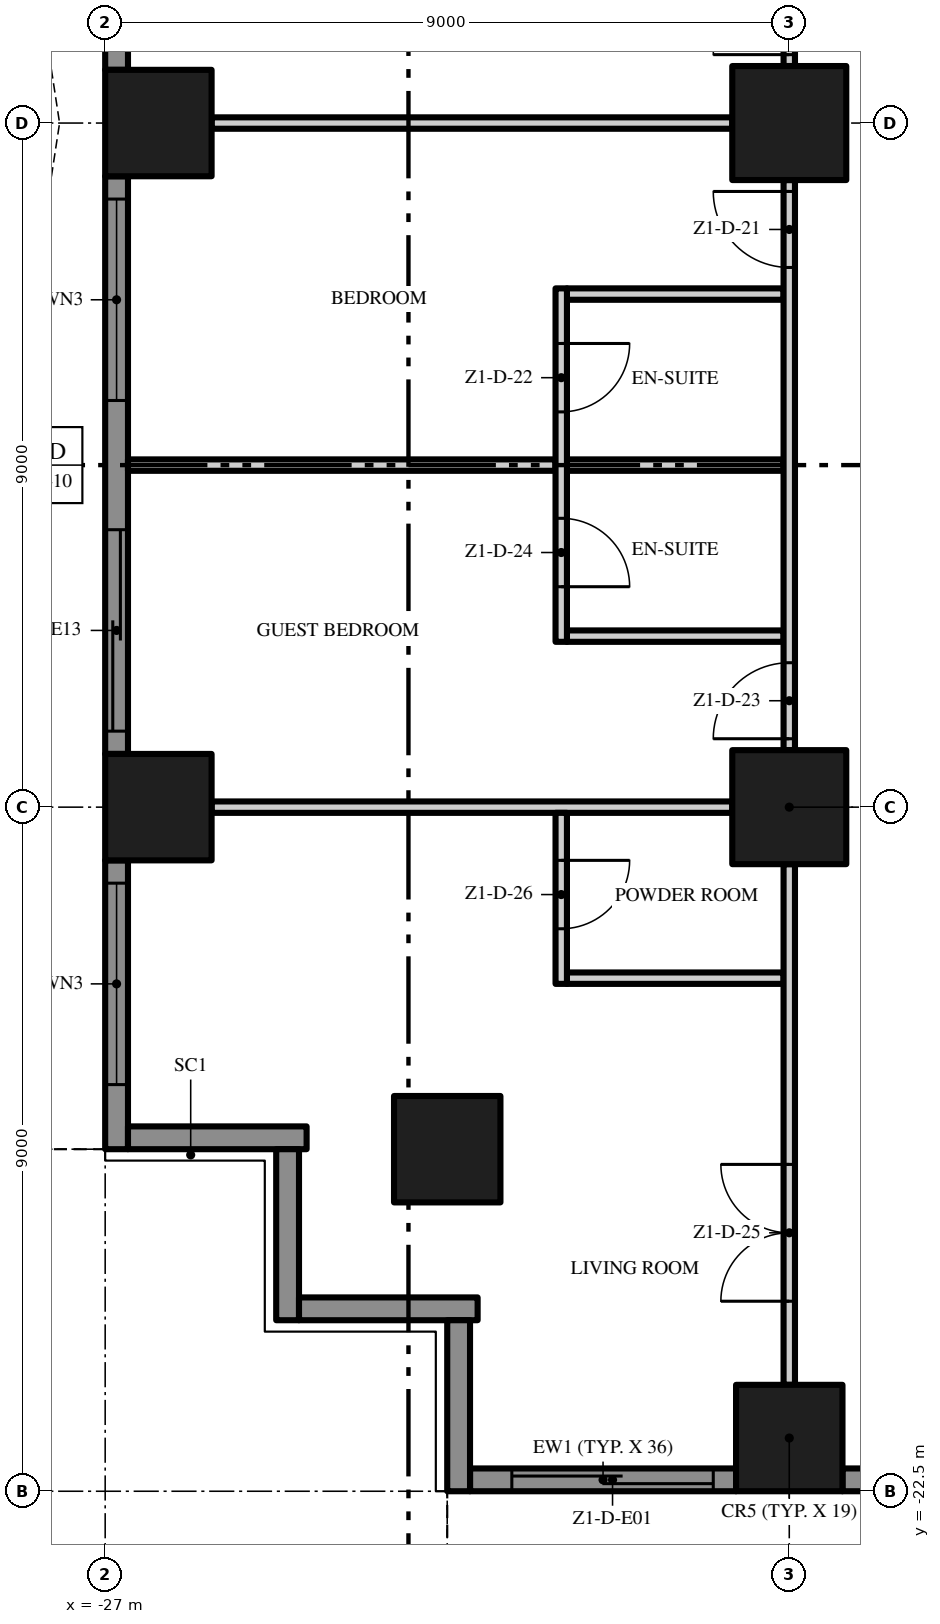
"""IFC4 building model, lengths in metres.
Left out: names, types, materials, properties, quantities, classifications, styles, units other than length and angle.
Written with IfcOpenShell. Run it as: python <this file> out.ifc"""

import sys

from ifc_helpers import new_model, si_unit, direction, frame, frame_2d, origin, origin_2d, place, context, subcontext, project, spatial, polyline, rectangle, outline, extrude, element, fill, save


model = new_model("IFC4")
c1 = context("Model", 3, precision=1e-05, world=origin(), true_north=direction((0.0, 1.0)))
c2 = subcontext(c1, "Body", "Model", "MODEL_VIEW")
j1 = project(units=[si_unit("LENGTHUNIT", "METRE"), si_unit("PLANEANGLEUNIT", "RADIAN")], contexts=[c1])
p1 = place(None, origin())
s1 = spatial("IfcSite", under=j1, at=p1, CompositionType="ELEMENT")
p2 = place(p1, origin())
s2 = spatial("IfcBuilding", under=s1, at=p2, CompositionType="ELEMENT")
p3 = place(p2, frame((0.0, 0.0, 53.0)))
s3 = spatial("IfcBuildingStorey", under=s2, at=p3, CompositionType="ELEMENT", Elevation=53.0)
p4 = place(p3, frame((-18.0, -13.5, 0.0), z_axis=(0.0, 0.0, 1.0), x_axis=(1.0, 0.0, 0.0)))
e1 = element("IfcColumn", 1, at=p4, inside=s3, PredefinedType="COLUMN", context=c2, shape_type="SweptSolid", body=[
    extrude(rectangle(XDim=1.5, YDim=1.5, at=origin_2d()), origin(), (0.0, 0.0, 1.0), 3.5),
])
p5 = place(p3, frame((-18.0, -21.8, 0.0), z_axis=(0.0, 0.0, 1.0), x_axis=(1.0, 0.0, 0.0)))
e2 = element("IfcColumn", 2, at=p5, inside=s3, PredefinedType="COLUMN", context=c2, shape_type="SweptSolid", body=[
    extrude(rectangle(XDim=1.4, YDim=1.4, at=origin_2d()), origin(), (0.0, 0.0, 1.0), 3.5),
])
p6 = place(p3, frame((-18.0, -4.5, 0.0), z_axis=(0.0, 0.0, 1.0), x_axis=(1.0, 0.0, 0.0)))
e3 = element("IfcColumn", 3, at=p6, inside=s3, PredefinedType="COLUMN", context=c2, shape_type="SweptSolid", body=[
    extrude(rectangle(XDim=1.5, YDim=1.5, at=origin_2d()), origin(), (0.0, 0.0, 1.0), 3.5),
])
for number, where, z_axis, x_axis in (
    (4, (-26.3, -13.5, 0.0), (0.0, 0.0, 1.0), (1.0, 0.0, 0.0)),
    (5, (-22.5, -18.0, 0.0), (0.0, 0.0, 1.0), (1.0, 0.0, 0.0)),
    (6, (-26.3, -4.5, 0.0), (0.0, 0.0, 1.0), (1.0, 0.0, 0.0)),
):
    element("IfcColumn", number, at=place(p3, frame(where, z_axis=z_axis, x_axis=x_axis)), inside=s3, PredefinedType="COLUMN", context=c2, shape_type="SweptSolid", body=[
        extrude(rectangle(XDim=1.4, YDim=1.4, at=origin_2d()), origin(), (0.0, 0.0, 1.0), 3.5),
    ])
p7 = place(p3, frame((-18.7, -22.35, 0.0), z_axis=(0.0, 0.0, 1.0), x_axis=(-1.0, 0.0, 0.0)))
e7 = element("IfcWall", 7, at=p7, inside=s3, PredefinedType="SOLIDWALL", context=c2, shape_type="SweptSolid", body=[
    extrude(rectangle(XDim=3.5, YDim=0.3, at=frame_2d((1.75, 0.0))), origin(), (0.0, 0.0, 1.0), 3.5),
])
p8 = place(p7, frame((0.3, 0.0, 0.0)))
e8 = element("IfcOpeningElement", 8, at=p8, cuts=e7, PredefinedType="OPENING", context=c2, shape_type="SweptSolid", body=[
    extrude(rectangle(XDim=2.65, YDim=2.4, at=frame_2d((1.325, 1.2))), frame((0.0, 0.16, 0.0), z_axis=(0.0, -1.0, 0.0), x_axis=(1.0, 0.0, 0.0)), (0.0, 0.0, 1.0), 0.32),
])
p9 = place(p3, frame((-9.7, -22.35, 0.0), z_axis=(0.0, 0.0, 1.0), x_axis=(-1.0, 0.0, 0.0)))
e9 = element("IfcWall", 9, at=p9, inside=s3, PredefinedType="SOLIDWALL", context=c2, shape_type="SweptSolid", body=[
    extrude(rectangle(XDim=7.6, YDim=0.3, at=frame_2d((3.8, 0.0))), origin(), (0.0, 0.0, 1.0), 3.5),
])
p10 = place(p9, frame((4.65, 0.0, 0.45)))
e10 = element("IfcOpeningElement", 10, at=p10, cuts=e9, PredefinedType="OPENING", context=c2, shape_type="SweptSolid", body=[
    extrude(rectangle(XDim=2.65, YDim=2.65, at=frame_2d((1.325, 1.325))), frame((0.0, 0.16, 0.0), z_axis=(0.0, -1.0, 0.0), x_axis=(1.0, 0.0, 0.0)), (0.0, 0.0, 1.0), 0.32),
])
p11 = place(p9, frame((0.3, 0.0, 0.45)))
e11 = element("IfcOpeningElement", 11, at=p11, cuts=e9, PredefinedType="OPENING", context=c2, shape_type="SweptSolid", body=[
    extrude(rectangle(XDim=2.65, YDim=2.65, at=frame_2d((1.325, 1.325))), frame((0.0, 0.16, 0.0), z_axis=(0.0, -1.0, 0.0), x_axis=(1.0, 0.0, 0.0)), (0.0, 0.0, 1.0), 0.32),
])
p12 = place(p3, frame((-26.85, -3.8, 0.0), z_axis=(0.0, 0.0, 1.0), x_axis=(0.0, 1.0, 0.0)))
e12 = element("IfcWall", 12, at=p12, inside=s3, PredefinedType="SOLIDWALL", context=c2, shape_type="SweptSolid", body=[
    extrude(rectangle(XDim=7.6, YDim=0.3, at=frame_2d((3.8, 0.0))), origin(), (0.0, 0.0, 1.0), 3.5),
])
p13 = place(p12, frame((4.65, 0.0, 0.0)))
e13 = element("IfcOpeningElement", 13, at=p13, cuts=e12, PredefinedType="OPENING", context=c2, shape_type="SweptSolid", body=[
    extrude(rectangle(XDim=2.65, YDim=2.4, at=frame_2d((1.325, 1.2))), frame((0.0, 0.16, 0.0), z_axis=(0.0, -1.0, 0.0), x_axis=(1.0, 0.0, 0.0)), (0.0, 0.0, 1.0), 0.32),
])
p14 = place(p12, frame((0.3, 0.0, 0.45)))
e14 = element("IfcOpeningElement", 14, at=p14, cuts=e12, PredefinedType="OPENING", context=c2, shape_type="SweptSolid", body=[
    extrude(rectangle(XDim=2.65, YDim=2.65, at=frame_2d((1.325, 1.325))), frame((0.0, 0.16, 0.0), z_axis=(0.0, -1.0, 0.0), x_axis=(1.0, 0.0, 0.0)), (0.0, 0.0, 1.0), 0.32),
])
p15 = place(p3, frame((-26.85, -12.8, 0.0), z_axis=(0.0, 0.0, 1.0), x_axis=(0.0, 1.0, 0.0)))
e15 = element("IfcWall", 15, at=p15, inside=s3, PredefinedType="SOLIDWALL", context=c2, shape_type="SweptSolid", body=[
    extrude(rectangle(XDim=7.6, YDim=0.3, at=frame_2d((3.8, 0.0))), origin(), (0.0, 0.0, 1.0), 3.5),
])
p16 = place(p15, frame((4.65, 0.0, 0.45)))
e16 = element("IfcOpeningElement", 16, at=p16, cuts=e15, PredefinedType="OPENING", context=c2, shape_type="SweptSolid", body=[
    extrude(rectangle(XDim=2.65, YDim=2.65, at=frame_2d((1.325, 1.325))), frame((0.0, 0.16, 0.0), z_axis=(0.0, -1.0, 0.0), x_axis=(1.0, 0.0, 0.0)), (0.0, 0.0, 1.0), 0.32),
])
p17 = place(p15, frame((0.3, 0.0, 0.0)))
e17 = element("IfcOpeningElement", 17, at=p17, cuts=e15, PredefinedType="OPENING", context=c2, shape_type="SweptSolid", body=[
    extrude(rectangle(XDim=2.65, YDim=2.4, at=frame_2d((1.325, 1.2))), frame((0.0, 0.16, 0.0), z_axis=(0.0, -1.0, 0.0), x_axis=(1.0, 0.0, 0.0)), (0.0, 0.0, 1.0), 0.32),
])
p18 = place(p3, frame((-26.85, -18.0, 0.0), z_axis=(0.0, 0.0, 1.0), x_axis=(0.0, 1.0, 0.0)))
e18 = element("IfcWall", 18, at=p18, inside=s3, PredefinedType="SOLIDWALL", context=c2, shape_type="SweptSolid", body=[
    extrude(rectangle(XDim=3.8, YDim=0.3, at=frame_2d((1.9, 0.0))), origin(), (0.0, 0.0, 1.0), 3.5),
])
p19 = place(p18, frame((0.85, 0.0, 0.45)))
e19 = element("IfcOpeningElement", 19, at=p19, cuts=e18, PredefinedType="OPENING", context=c2, shape_type="SweptSolid", body=[
    extrude(rectangle(XDim=2.65, YDim=2.65, at=frame_2d((1.325, 1.325))), frame((0.0, 0.16, 0.0), z_axis=(0.0, -1.0, 0.0), x_axis=(1.0, 0.0, 0.0)), (0.0, 0.0, 1.0), 0.32),
])
p20 = place(p3, frame((-24.35, -17.85, 0.0), z_axis=(0.0, 0.0, 1.0), x_axis=(-1.0, 0.0, 0.0)))
e20 = element("IfcWall", 20, at=p20, inside=s3, PredefinedType="SOLIDWALL", context=c2, shape_type="SweptSolid", body=[
    extrude(rectangle(XDim=2.35, YDim=0.3, at=frame_2d((1.175, 0.0))), origin(), (0.0, 0.0, 1.0), 3.5),
])
p21 = place(p3, frame((-24.6, -20.25, 0.0), z_axis=(0.0, 0.0, 1.0), x_axis=(0.0, 1.0, 0.0)))
e21 = element("IfcWall", 21, at=p21, inside=s3, PredefinedType="SOLIDWALL", context=c2, shape_type="SweptSolid", body=[
    extrude(rectangle(XDim=2.25, YDim=0.3, at=frame_2d((1.125, 0.0))), origin(), (0.0, 0.0, 1.0), 3.5),
])
p22 = place(p3, frame((-22.1, -20.1, 0.0), z_axis=(0.0, 0.0, 1.0), x_axis=(-1.0, 0.0, 0.0)))
e22 = element("IfcWall", 22, at=p22, inside=s3, PredefinedType="SOLIDWALL", context=c2, shape_type="SweptSolid", body=[
    extrude(rectangle(XDim=2.35, YDim=0.3, at=frame_2d((1.175, 0.0))), origin(), (0.0, 0.0, 1.0), 3.5),
])
p23 = place(p3, frame((-22.35, -22.5, 0.0), z_axis=(0.0, 0.0, 1.0), x_axis=(0.0, 1.0, 0.0)))
e23 = element("IfcWall", 23, at=p23, inside=s3, PredefinedType="SOLIDWALL", context=c2, shape_type="SweptSolid", body=[
    extrude(rectangle(XDim=2.25, YDim=0.3, at=frame_2d((1.125, 0.0))), origin(), (0.0, 0.0, 1.0), 3.5),
])
p24 = place(p3, origin())
e24 = element("IfcWall", 24, at=p24, inside=s3, PredefinedType="USERDEFINED", context=c2, shape_type="SweptSolid", body=[
    extrude(outline(polyline([(-22.5, -25.5), (-21.0, -25.271), (-19.5, -24.671), (-18.0, -23.929), (-16.5, -23.329), (-15.0, -23.1), (-13.5, -23.329), (-12.0, -23.929), (-10.5, -24.671), (-9.0, -25.271), (-7.5, -25.5), (-6.0, -25.271), (-4.5, -24.671), (-3.0, -23.929), (-1.5, -23.329), (0.0, -23.1), (1.5, -23.329), (3.0, -23.929), (4.5, -24.671), (6.0, -25.271), (7.5, -25.5), (9.0, -25.271), (10.5, -24.671), (12.0, -23.929), (13.5, -23.329), (15.0, -23.1), (16.5, -23.329), (18.0, -23.929), (19.5, -24.671), (21.0, -25.271), (22.5, -25.5), (22.538, -25.253), (21.066, -25.028), (19.602, -24.442), (18.102, -23.701), (16.566, -23.086), (15.0, -22.847), (13.434, -23.086), (11.898, -23.701), (10.398, -24.442), (8.934, -25.028), (7.5, -25.247), (6.066, -25.028), (4.602, -24.442), (3.102, -23.701), (1.566, -23.086), (0.0, -22.847), (-1.566, -23.086), (-3.102, -23.701), (-4.602, -24.442), (-6.066, -25.028), (-7.5, -25.247), (-8.934, -25.028), (-10.398, -24.442), (-11.898, -23.701), (-13.434, -23.086), (-15.0, -22.847), (-16.566, -23.086), (-18.102, -23.701), (-19.602, -24.442), (-21.066, -25.028), (-22.538, -25.253), (-22.5, -25.5)])), origin(), (0.0, 0.0, 1.0), 0.9),
])
p25 = place(p3, origin())
e25 = element("IfcWall", 25, at=p25, inside=s3, PredefinedType="USERDEFINED", context=c2, shape_type="SweptSolid", body=[
    extrude(outline(polyline([(-30.0, 18.0), (-29.771, 16.5), (-29.171, 15.0), (-28.429, 13.5), (-27.829, 12.0), (-27.6, 10.5), (-27.829, 9.0), (-28.429, 7.5), (-29.171, 6.0), (-29.771, 4.5), (-30.0, 3.0), (-29.771, 1.5), (-29.171, 0.0), (-28.429, -1.5), (-27.829, -3.0), (-27.6, -4.5), (-27.829, -6.0), (-28.429, -7.5), (-29.171, -9.0), (-29.771, -10.5), (-30.0, -12.0), (-29.771, -13.5), (-29.171, -15.0), (-28.429, -16.5), (-27.829, -18.0), (-27.597, -17.907), (-28.201, -16.398), (-28.942, -14.898), (-29.528, -13.434), (-29.747, -12.0), (-29.528, -10.566), (-28.942, -9.102), (-28.201, -7.602), (-27.586, -6.066), (-27.347, -4.5), (-27.586, -2.934), (-28.201, -1.398), (-28.942, 0.102), (-29.528, 1.566), (-29.747, 3.0), (-29.528, 4.434), (-28.942, 5.898), (-28.201, 7.398), (-27.586, 8.934), (-27.347, 10.5), (-27.586, 12.066), (-28.201, 13.602), (-28.942, 15.102), (-29.528, 16.566), (-29.753, 18.038), (-30.0, 18.0)])), origin(), (0.0, 0.0, 1.0), 0.9),
])
p26 = place(p3, frame((-20.925, -15.75, 0.0), z_axis=(0.0, 0.0, 1.0), x_axis=(1.0, 0.0, 0.0)))
e26 = element("IfcWall", 26, at=p26, inside=s3, PredefinedType="PARTITIONING", context=c2, shape_type="SweptSolid", body=[
    extrude(rectangle(XDim=2.85, YDim=0.15, at=frame_2d((1.425, 0.0))), origin(), (0.0, 0.0, 1.0), 3.5),
])
p27 = place(p3, frame((-25.6, -13.5, 0.0), z_axis=(0.0, 0.0, 1.0), x_axis=(1.0, 0.0, 0.0)))
e27 = element("IfcWall", 27, at=p27, inside=s3, PredefinedType="PARTITIONING", context=c2, shape_type="SweptSolid", body=[
    extrude(rectangle(XDim=6.85, YDim=0.15, at=frame_2d((3.425, 0.0))), origin(), (0.0, 0.0, 1.0), 3.5),
])
p28 = place(p3, frame((-20.925, -11.25, 0.0), z_axis=(0.0, 0.0, 1.0), x_axis=(1.0, 0.0, 0.0)))
e28 = element("IfcWall", 28, at=p28, inside=s3, PredefinedType="PARTITIONING", context=c2, shape_type="SweptSolid", body=[
    extrude(rectangle(XDim=2.85, YDim=0.15, at=frame_2d((1.425, 0.0))), origin(), (0.0, 0.0, 1.0), 3.5),
])
p29 = place(p3, frame((-26.7, -9.0, 0.0), z_axis=(0.0, 0.0, 1.0), x_axis=(1.0, 0.0, 0.0)))
e29 = element("IfcWall", 29, at=p29, inside=s3, PredefinedType="PARTITIONING", context=c2, shape_type="SweptSolid", body=[
    extrude(rectangle(XDim=5.625, YDim=0.15, at=frame_2d((2.812, 0.0))), origin(), (0.0, 0.0, 1.0), 3.5),
])
for number, where, z_axis, x_axis in (
    (30, (-20.925, -9.0, 0.0), (0.0, 0.0, 1.0), (1.0, 0.0, 0.0)),
    (31, (-20.925, -6.75, 0.0), (0.0, 0.0, 1.0), (1.0, 0.0, 0.0)),
):
    element("IfcWall", number, at=place(p3, frame(where, z_axis=z_axis, x_axis=x_axis)), inside=s3, PredefinedType="PARTITIONING", context=c2, shape_type="SweptSolid", body=[
        extrude(rectangle(XDim=2.85, YDim=0.15, at=frame_2d((1.425, 0.0))), origin(), (0.0, 0.0, 1.0), 3.5),
    ])
p30 = place(p3, frame((-25.6, -4.5, 0.0), z_axis=(0.0, 0.0, 1.0), x_axis=(1.0, 0.0, 0.0)))
e32 = element("IfcWall", 32, at=p30, inside=s3, PredefinedType="PARTITIONING", context=c2, shape_type="SweptSolid", body=[
    extrude(rectangle(XDim=6.85, YDim=0.15, at=frame_2d((3.425, 0.0))), origin(), (0.0, 0.0, 1.0), 3.5),
])
p31 = place(p3, frame((-21.0, -13.575, 0.0), z_axis=(0.0, 0.0, 1.0), x_axis=(0.0, -1.0, 0.0)))
e33 = element("IfcWall", 33, at=p31, inside=s3, PredefinedType="PARTITIONING", context=c2, shape_type="SweptSolid", body=[
    extrude(rectangle(XDim=2.25, YDim=0.15, at=frame_2d((1.125, 0.0))), origin(), (0.0, 0.0, 1.0), 3.5),
])
p32 = place(p31, frame((0.625, 0.0, 0.0)))
e34 = element("IfcOpeningElement", 34, at=p32, cuts=e33, PredefinedType="OPENING", context=c2, shape_type="SweptSolid", body=[
    extrude(rectangle(XDim=0.9, YDim=2.1, at=frame_2d((0.45, 1.05))), frame((0.0, 0.085, 0.0), z_axis=(0.0, -1.0, 0.0), x_axis=(1.0, 0.0, 0.0)), (0.0, 0.0, 1.0), 0.17),
])
p33 = place(p3, frame((-21.0, -6.675, 0.0), z_axis=(0.0, 0.0, 1.0), x_axis=(0.0, -1.0, 0.0)))
e35 = element("IfcWall", 35, at=p33, inside=s3, PredefinedType="PARTITIONING", context=c2, shape_type="SweptSolid", body=[
    extrude(rectangle(XDim=4.65, YDim=0.15, at=frame_2d((2.325, 0.0))), origin(), (0.0, 0.0, 1.0), 3.5),
])
p34 = place(p33, frame((0.725, 0.0, 0.0)))
e36 = element("IfcOpeningElement", 36, at=p34, cuts=e35, PredefinedType="OPENING", context=c2, shape_type="SweptSolid", body=[
    extrude(rectangle(XDim=0.9, YDim=2.1, at=frame_2d((0.45, 1.05))), frame((0.0, 0.085, 0.0), z_axis=(0.0, -1.0, 0.0), x_axis=(1.0, 0.0, 0.0)), (0.0, 0.0, 1.0), 0.17),
])
p35 = place(p33, frame((3.025, 0.0, 0.0)))
e37 = element("IfcOpeningElement", 37, at=p35, cuts=e35, PredefinedType="OPENING", context=c2, shape_type="SweptSolid", body=[
    extrude(rectangle(XDim=0.9, YDim=2.1, at=frame_2d((0.45, 1.05))), frame((0.0, 0.085, 0.0), z_axis=(0.0, -1.0, 0.0), x_axis=(1.0, 0.0, 0.0)), (0.0, 0.0, 1.0), 0.17),
])
p36 = place(p3, frame((-18.0, -21.1, 0.0), z_axis=(0.0, 0.0, 1.0), x_axis=(0.0, 1.0, 0.0)))
e38 = element("IfcWall", 38, at=p36, inside=s3, PredefinedType="PARTITIONING", context=c2, shape_type="SweptSolid", body=[
    extrude(rectangle(XDim=6.85, YDim=0.15, at=frame_2d((3.425, 0.0))), origin(), (0.0, 0.0, 1.0), 3.5),
])
p37 = place(p36, frame((1.1, 0.0, 0.0)))
e39 = element("IfcOpeningElement", 39, at=p37, cuts=e38, PredefinedType="OPENING", context=c2, shape_type="SweptSolid", body=[
    extrude(rectangle(XDim=1.8, YDim=2.4, at=frame_2d((0.9, 1.2))), frame((0.0, 0.085, 0.0), z_axis=(0.0, -1.0, 0.0), x_axis=(1.0, 0.0, 0.0)), (0.0, 0.0, 1.0), 0.17),
])
p38 = place(p3, frame((-18.0, -12.75, 0.0), z_axis=(0.0, 0.0, 1.0), x_axis=(0.0, 1.0, 0.0)))
e40 = element("IfcWall", 40, at=p38, inside=s3, PredefinedType="PARTITIONING", context=c2, shape_type="SweptSolid", body=[
    extrude(rectangle(XDim=7.5, YDim=0.15, at=frame_2d((3.75, 0.0))), origin(), (0.0, 0.0, 1.0), 3.5),
])
p39 = place(p38, frame((6.35, 0.0, 0.0)))
e41 = element("IfcOpeningElement", 41, at=p39, cuts=e40, PredefinedType="OPENING", context=c2, shape_type="SweptSolid", body=[
    extrude(rectangle(XDim=1.0, YDim=2.4, at=frame_2d((0.5, 1.2))), frame((0.0, 0.085, 0.0), z_axis=(0.0, -1.0, 0.0), x_axis=(1.0, 0.0, 0.0)), (0.0, 0.0, 1.0), 0.17),
])
p40 = place(p38, frame((0.15, 0.0, 0.0)))
e42 = element("IfcOpeningElement", 42, at=p40, cuts=e40, PredefinedType="OPENING", context=c2, shape_type="SweptSolid", body=[
    extrude(rectangle(XDim=1.0, YDim=2.4, at=frame_2d((0.5, 1.2))), frame((0.0, 0.085, 0.0), z_axis=(0.0, -1.0, 0.0), x_axis=(1.0, 0.0, 0.0)), (0.0, 0.0, 1.0), 0.17),
])
p41 = place(p3, frame((-18.0, -3.75, 0.0), z_axis=(0.0, 0.0, 1.0), x_axis=(0.0, 1.0, 0.0)))
e43 = element("IfcWall", 43, at=p41, inside=s3, PredefinedType="PARTITIONING", context=c2, shape_type="SweptSolid", body=[
    extrude(rectangle(XDim=3.65, YDim=0.15, at=frame_2d((1.825, 0.0))), origin(), (0.0, 0.0, 1.0), 3.5),
])
p42 = place(p41, frame((0.15, 0.0, 0.0)))
e44 = element("IfcOpeningElement", 44, at=p42, cuts=e43, PredefinedType="OPENING", context=c2, shape_type="SweptSolid", body=[
    extrude(rectangle(XDim=1.0, YDim=2.4, at=frame_2d((0.5, 1.2))), frame((0.0, 0.085, 0.0), z_axis=(0.0, -1.0, 0.0), x_axis=(1.0, 0.0, 0.0)), (0.0, 0.0, 1.0), 0.17),
])
p43 = place(p8, origin())
e45 = element("IfcDoor", 45, at=p43, inside=s3, OperationType="SINGLE_SWING_LEFT", PredefinedType="DOOR", context=c2, shape_type="SweptSolid", body=[
    extrude(rectangle(XDim=2.65, YDim=2.4, at=frame_2d((1.325, 1.2))), frame((0.0, 0.025, 0.0), z_axis=(0.0, -1.0, 0.0), x_axis=(1.0, 0.0, 0.0)), (0.0, 0.0, 1.0), 0.05),
])
fill(e8, e45)
p44 = place(p16, origin())
e46 = element("IfcWindow", 46, at=p44, inside=s3, PartitioningType="SINGLE_PANEL", PredefinedType="WINDOW", context=c2, shape_type="SweptSolid", body=[
    extrude(rectangle(XDim=2.65, YDim=2.65, at=frame_2d((1.325, 1.325))), frame((0.0, 0.03, 0.0), z_axis=(0.0, -1.0, 0.0), x_axis=(1.0, 0.0, 0.0)), (0.0, 0.0, 1.0), 0.06),
])
fill(e16, e46)
p45 = place(p17, origin())
e47 = element("IfcDoor", 47, at=p45, inside=s3, OperationType="SINGLE_SWING_LEFT", PredefinedType="DOOR", context=c2, shape_type="SweptSolid", body=[
    extrude(rectangle(XDim=2.65, YDim=2.4, at=frame_2d((1.325, 1.2))), frame((0.0, 0.025, 0.0), z_axis=(0.0, -1.0, 0.0), x_axis=(1.0, 0.0, 0.0)), (0.0, 0.0, 1.0), 0.05),
])
fill(e17, e47)
p46 = place(p19, origin())
e48 = element("IfcWindow", 48, at=p46, inside=s3, PartitioningType="SINGLE_PANEL", PredefinedType="WINDOW", context=c2, shape_type="SweptSolid", body=[
    extrude(rectangle(XDim=2.65, YDim=2.65, at=frame_2d((1.325, 1.325))), frame((0.0, 0.03, 0.0), z_axis=(0.0, -1.0, 0.0), x_axis=(1.0, 0.0, 0.0)), (0.0, 0.0, 1.0), 0.06),
])
fill(e19, e48)
p47 = place(p42, origin())
e49 = element("IfcDoor", 49, at=p47, inside=s3, OperationType="SINGLE_SWING_LEFT", PredefinedType="DOOR", context=c2, shape_type="SweptSolid", body=[
    extrude(rectangle(XDim=1.0, YDim=2.4, at=frame_2d((0.5, 1.2))), frame((0.0, 0.025, 0.0), z_axis=(0.0, -1.0, 0.0), x_axis=(1.0, 0.0, 0.0)), (0.0, 0.0, 1.0), 0.05),
])
fill(e44, e49)
p48 = place(p39, origin())
e50 = element("IfcDoor", 50, at=p48, inside=s3, OperationType="SINGLE_SWING_RIGHT", PredefinedType="DOOR", context=c2, shape_type="SweptSolid", body=[
    extrude(rectangle(XDim=1.0, YDim=2.4, at=frame_2d((0.5, 1.2))), frame((0.0, 0.025, 0.0), z_axis=(0.0, -1.0, 0.0), x_axis=(1.0, 0.0, 0.0)), (0.0, 0.0, 1.0), 0.05),
])
fill(e41, e50)
p49 = place(p34, origin())
e51 = element("IfcDoor", 51, at=p49, inside=s3, OperationType="SINGLE_SWING_LEFT", PredefinedType="DOOR", context=c2, shape_type="SweptSolid", body=[
    extrude(rectangle(XDim=0.9, YDim=2.1, at=frame_2d((0.45, 1.05))), frame((0.0, 0.025, 0.0), z_axis=(0.0, -1.0, 0.0), x_axis=(1.0, 0.0, 0.0)), (0.0, 0.0, 1.0), 0.05),
])
fill(e36, e51)
p50 = place(p40, origin())
e52 = element("IfcDoor", 52, at=p50, inside=s3, OperationType="SINGLE_SWING_LEFT", PredefinedType="DOOR", context=c2, shape_type="SweptSolid", body=[
    extrude(rectangle(XDim=1.0, YDim=2.4, at=frame_2d((0.5, 1.2))), frame((0.0, 0.025, 0.0), z_axis=(0.0, -1.0, 0.0), x_axis=(1.0, 0.0, 0.0)), (0.0, 0.0, 1.0), 0.05),
])
fill(e42, e52)
p51 = place(p35, origin())
e53 = element("IfcDoor", 53, at=p51, inside=s3, OperationType="SINGLE_SWING_RIGHT", PredefinedType="DOOR", context=c2, shape_type="SweptSolid", body=[
    extrude(rectangle(XDim=0.9, YDim=2.1, at=frame_2d((0.45, 1.05))), frame((0.0, 0.025, 0.0), z_axis=(0.0, -1.0, 0.0), x_axis=(1.0, 0.0, 0.0)), (0.0, 0.0, 1.0), 0.05),
])
fill(e37, e53)
p52 = place(p37, origin())
e54 = element("IfcDoor", 54, at=p52, inside=s3, OperationType="DOUBLE_DOOR_SINGLE_SWING", PredefinedType="DOOR", context=c2, shape_type="SweptSolid", body=[
    extrude(rectangle(XDim=1.8, YDim=2.4, at=frame_2d((0.9, 1.2))), frame((0.0, 0.025, 0.0), z_axis=(0.0, -1.0, 0.0), x_axis=(1.0, 0.0, 0.0)), (0.0, 0.0, 1.0), 0.05),
])
fill(e39, e54)
p53 = place(p32, origin())
e55 = element("IfcDoor", 55, at=p53, inside=s3, OperationType="SINGLE_SWING_LEFT", PredefinedType="DOOR", context=c2, shape_type="SweptSolid", body=[
    extrude(rectangle(XDim=0.9, YDim=2.1, at=frame_2d((0.45, 1.05))), frame((0.0, 0.025, 0.0), z_axis=(0.0, -1.0, 0.0), x_axis=(1.0, 0.0, 0.0)), (0.0, 0.0, 1.0), 0.05),
])
fill(e34, e55)
save(model, sys.argv[1])
